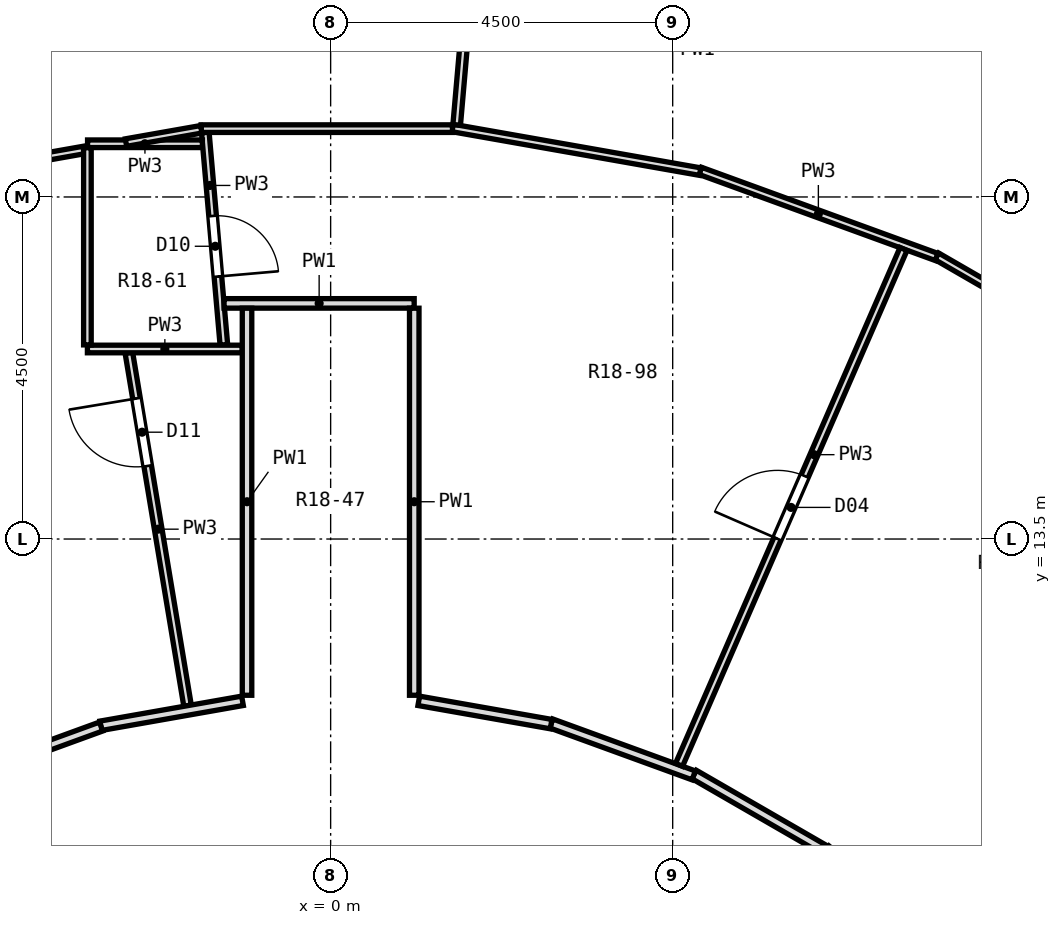
"""IFC4 building model, lengths in metres.
Left out: names, types, materials, properties, quantities, classifications, styles, units other than length and angle.
Written with IfcOpenShell. Run it as: python <this file> out.ifc"""

import sys

from ifc_helpers import new_model, si_unit, direction, frame, frame_2d, origin, place, context, subcontext, project, spatial, rectangle, extrude, element, fill, save


model = new_model("IFC4")
c1 = context("Model", 3, precision=1e-05, world=origin(), true_north=direction((0.0, 1.0)))
c2 = subcontext(c1, "Body", "Model", "MODEL_VIEW")
j1 = project(units=[si_unit("LENGTHUNIT", "METRE"), si_unit("PLANEANGLEUNIT", "RADIAN")], contexts=[c1])
p1 = place(None, origin())
s1 = spatial("IfcSite", under=j1, at=p1, CompositionType="ELEMENT")
p2 = place(p1, origin())
s2 = spatial("IfcBuilding", under=s1, at=p2, CompositionType="ELEMENT")
p3 = place(p2, frame((0.0, 0.0, 101.8)))
s3 = spatial("IfcBuildingStorey", under=s2, at=p3, CompositionType="ELEMENT", Elevation=101.8)
p4 = place(p3, frame((-1.649, 18.849, 0.0), z_axis=(0.0, 0.0, 1.0), x_axis=(0.087061215869, -0.996202963603, 0.0)))
e1 = element("IfcWall", 1, at=p4, inside=s3, PredefinedType="PARTITIONING", context=c2, shape_type="SweptSolid", body=[
    extrude(rectangle(XDim=2.807, YDim=0.1, at=frame_2d((1.404, 0.0))), origin(), (0.0, 0.0, 1.0), 2.8),
])
p5 = place(p4, frame((1.103, 0.0, 0.0)))
e2 = element("IfcOpeningElement", 2, at=p5, cuts=e1, PredefinedType="OPENING", context=c2, shape_type="SweptSolid", body=[
    extrude(rectangle(XDim=0.8, YDim=2.1, at=frame_2d((0.4, 1.05))), frame((0.0, 0.062, 0.0), z_axis=(0.0, -1.0, 0.0), x_axis=(1.0, 0.0, 0.0)), (0.0, 0.0, 1.0), 0.124),
])
p6 = place(p3, frame((-2.655, 15.951, 0.0), z_axis=(0.0, 0.0, 1.0), x_axis=(0.164012054584, -0.986458334625, 0.0)))
e3 = element("IfcWall", 3, at=p6, inside=s3, PredefinedType="PARTITIONING", context=c2, shape_type="SweptSolid", body=[
    extrude(rectangle(XDim=4.707, YDim=0.1, at=frame_2d((2.354, 0.0))), origin(), (0.0, 0.0, 1.0), 2.8),
])
p7 = place(p6, frame((0.61, 0.0, 0.0)))
e4 = element("IfcOpeningElement", 4, at=p7, cuts=e3, PredefinedType="OPENING", context=c2, shape_type="SweptSolid", body=[
    extrude(rectangle(XDim=0.9, YDim=2.1, at=frame_2d((0.45, 1.05))), frame((0.0, 0.062, 0.0), z_axis=(0.0, -1.0, 0.0), x_axis=(1.0, 0.0, 0.0)), (0.0, 0.0, 1.0), 0.124),
])
p8 = place(p3, frame((4.781, 10.403, 0.0), z_axis=(0.0, 0.0, 1.0), x_axis=(0.866173368732, -0.499743629573, 0.0)))
e5 = element("IfcWall", 5, at=p8, inside=s3, PredefinedType="PARTITIONING", context=c2, shape_type="SweptSolid", body=[
    extrude(rectangle(XDim=1.996, YDim=0.125, at=frame_2d((0.998, 0.0))), origin(), (0.0, 0.0, 1.0), 2.8),
])
p9 = place(p3, frame((7.974, 17.219, 0.0), z_axis=(0.0, 0.0, 1.0), x_axis=(0.865857256379, -0.500291126821, 0.0)))
e6 = element("IfcWall", 6, at=p9, inside=s3, PredefinedType="PARTITIONING", context=c2, shape_type="SweptSolid", body=[
    extrude(rectangle(XDim=3.307, YDim=0.1, at=frame_2d((1.654, 0.0))), origin(), (0.0, 0.0, 1.0), 2.8),
])
p10 = place(p3, frame((7.172, 20.695, 0.0), z_axis=(0.0, 0.0, 1.0), x_axis=(0.939171474452, -0.343448601069, 0.0)))
e7 = element("IfcWall", 7, at=p10, inside=s3, PredefinedType="PARTITIONING", context=c2, shape_type="SweptSolid", body=[
    extrude(rectangle(XDim=2.252, YDim=0.1, at=frame_2d((1.126, 0.0))), origin(), (0.0, 0.0, 1.0), 2.8),
])
p11 = place(p3, frame((2.902, 11.073, 0.0), z_axis=(0.0, 0.0, 1.0), x_axis=(0.939557391744, -0.342391453777, 0.0)))
e8 = element("IfcWall", 8, at=p11, inside=s3, PredefinedType="PARTITIONING", context=c2, shape_type="SweptSolid", body=[
    extrude(rectangle(XDim=1.995, YDim=0.125, at=frame_2d((0.998, 0.0))), origin(), (0.0, 0.0, 1.0), 2.8),
])
p12 = place(p3, frame((4.863, 18.344, 0.0), z_axis=(0.0, 0.0, 1.0), x_axis=(0.939551875713, -0.342406589955, 0.0)))
e9 = element("IfcWall", 9, at=p12, inside=s3, PredefinedType="PARTITIONING", context=c2, shape_type="SweptSolid", body=[
    extrude(rectangle(XDim=3.308, YDim=0.1, at=frame_2d((1.654, 0.0))), origin(), (0.0, 0.0, 1.0), 2.8),
])
p13 = place(p3, frame((1.16, 11.371, 0.0), z_axis=(0.0, 0.0, 1.0), x_axis=(0.984859944288, -0.173351925678, 0.0)))
e10 = element("IfcWall", 10, at=p13, inside=s3, PredefinedType="PARTITIONING", context=c2, shape_type="SweptSolid", body=[
    extrude(rectangle(XDim=1.768, YDim=0.125, at=frame_2d((0.884, 0.0))), origin(), (0.0, 0.0, 1.0), 2.8),
])
p14 = place(p3, frame((1.603, 18.908, 0.0), z_axis=(0.0, 0.0, 1.0), x_axis=(0.984831814927, -0.173511660439, 0.0)))
e11 = element("IfcWall", 11, at=p14, inside=s3, PredefinedType="PARTITIONING", context=c2, shape_type="SweptSolid", body=[
    extrude(rectangle(XDim=3.308, YDim=0.1, at=frame_2d((1.654, 0.0))), origin(), (0.0, 0.0, 1.0), 2.8),
])
p15 = place(p3, frame((-3.2, 16.0, 0.0), z_axis=(0.0, 0.0, 1.0), x_axis=(1.0, 0.0, 0.0)))
e12 = element("IfcWall", 12, at=p15, inside=s3, PredefinedType="PARTITIONING", context=c2, shape_type="SweptSolid", body=[
    extrude(rectangle(XDim=2.037, YDim=0.1, at=frame_2d((1.019, 0.0))), origin(), (0.0, 0.0, 1.0), 2.8),
])
p16 = place(p3, frame((-1.402, 16.6, 0.0), z_axis=(0.0, 0.0, 1.0), x_axis=(1.0, 0.0, 0.0)))
e13 = element("IfcWall", 13, at=p16, inside=s3, PredefinedType="PARTITIONING", context=c2, shape_type="SweptSolid", body=[
    extrude(rectangle(XDim=2.501, YDim=0.125, at=frame_2d((1.251, 0.0))), origin(), (0.0, 0.0, 1.0), 2.8),
])
p17 = place(p3, frame((-3.198, 18.7, 0.0), z_axis=(0.0, 0.0, 1.0), x_axis=(1.0, 0.0, 0.0)))
e14 = element("IfcWall", 14, at=p17, inside=s3, PredefinedType="PARTITIONING", context=c2, shape_type="SweptSolid", body=[
    extrude(rectangle(XDim=1.511, YDim=0.1, at=frame_2d((0.755, 0.0))), origin(), (0.0, 0.0, 1.0), 2.8),
])
p18 = place(p3, frame((-1.704, 18.899, 0.0), z_axis=(0.0, 0.0, 1.0), x_axis=(1.0, 0.0, 0.0)))
e15 = element("IfcWall", 15, at=p18, inside=s3, PredefinedType="PARTITIONING", context=c2, shape_type="SweptSolid", body=[
    extrude(rectangle(XDim=3.307, YDim=0.1, at=frame_2d((1.653, 0.0))), origin(), (0.0, 0.0, 1.0), 2.8),
])
p19 = place(p3, frame((-3.024, 11.043, 0.0), z_axis=(0.0, 0.0, 1.0), x_axis=(0.984843218933, 0.173446920187, 0.0)))
e16 = element("IfcWall", 16, at=p19, inside=s3, PredefinedType="PARTITIONING", context=c2, shape_type="SweptSolid", body=[
    extrude(rectangle(XDim=1.893, YDim=0.125, at=frame_2d((0.947, 0.0))), origin(), (0.0, 0.0, 1.0), 2.8),
])
p20 = place(p3, frame((-4.96, 18.315, 0.0), z_axis=(0.0, 0.0, 1.0), x_axis=(0.984767989426, 0.173873537385, 0.0)))
e17 = element("IfcWall", 17, at=p20, inside=s3, PredefinedType="PARTITIONING", context=c2, shape_type="SweptSolid", body=[
    extrude(rectangle(XDim=1.737, YDim=0.1, at=frame_2d((0.868, 0.0))), origin(), (0.0, 0.0, 1.0), 2.8),
])
p21 = place(p3, frame((-2.692, 18.716, 0.0), z_axis=(0.0, 0.0, 1.0), x_axis=(0.984773780307, 0.173840736366, 0.0)))
e18 = element("IfcWall", 18, at=p21, inside=s3, PredefinedType="PARTITIONING", context=c2, shape_type="SweptSolid", body=[
    extrude(rectangle(XDim=1.006, YDim=0.1, at=frame_2d((0.503, 0.0))), origin(), (0.0, 0.0, 1.0), 2.8),
])
p22 = place(p3, frame((-4.896, 10.349, 0.0), z_axis=(0.0, 0.0, 1.0), x_axis=(0.939546719529, 0.342420738016, 0.0)))
e19 = element("IfcWall", 19, at=p22, inside=s3, PredefinedType="PARTITIONING", context=c2, shape_type="SweptSolid", body=[
    extrude(rectangle(XDim=1.996, YDim=0.125, at=frame_2d((0.998, 0.0))), origin(), (0.0, 0.0, 1.0), 2.8),
])
p23 = place(p3, frame((8.136, 8.136, 0.0), z_axis=(0.0, 0.0, 1.0), x_axis=(0.707106781187, 0.707106781187, 0.0)))
e20 = element("IfcWall", 20, at=p23, inside=s3, PredefinedType="PARTITIONING", context=c2, shape_type="SweptSolid", body=[
    extrude(rectangle(XDim=7.415, YDim=0.125, at=frame_2d((3.708, 0.0))), origin(), (0.0, 0.0, 1.0), 2.8),
])
p24 = place(p3, frame((4.584, 10.529, 0.0), z_axis=(0.0, 0.0, 1.0), x_axis=(0.39900110087, 0.916950446592, 0.0)))
e21 = element("IfcWall", 21, at=p24, inside=s3, PredefinedType="PARTITIONING", context=c2, shape_type="SweptSolid", body=[
    extrude(rectangle(XDim=7.401, YDim=0.1, at=frame_2d((3.701, 0.0))), origin(), (0.0, 0.0, 1.0), 2.8),
])
p25 = place(p24, frame((3.243, 0.0, 0.0)))
e22 = element("IfcOpeningElement", 22, at=p25, cuts=e21, PredefinedType="OPENING", context=c2, shape_type="SweptSolid", body=[
    extrude(rectangle(XDim=0.9, YDim=2.1, at=frame_2d((0.45, 1.05))), frame((0.0, 0.062, 0.0), z_axis=(0.0, -1.0, 0.0), x_axis=(1.0, 0.0, 0.0)), (0.0, 0.0, 1.0), 0.124),
])
p26 = place(p3, frame((1.658, 18.949, 0.0), z_axis=(0.0, 0.0, 1.0), x_axis=(0.087052988713, 0.996203682565, 0.0)))
e23 = element("IfcWall", 23, at=p26, inside=s3, PredefinedType="PARTITIONING", context=c2, shape_type="SweptSolid", body=[
    extrude(rectangle(XDim=6.644, YDim=0.1, at=frame_2d((3.322, 0.0))), origin(), (0.0, 0.0, 1.0), 2.8),
])
for number, where, z_axis, x_axis in (
    (24, (1.1, 11.445, 0.0), (0.0, 0.0, 1.0), (0.0, 1.0, 0.0)),
    (25, (-1.1, 11.445, 0.0), (0.0, 0.0, 1.0), (0.0, 1.0, 0.0)),
):
    element("IfcWall", number, at=place(p3, frame(where, z_axis=z_axis, x_axis=x_axis)), inside=s3, PredefinedType="PARTITIONING", context=c2, shape_type="SweptSolid", body=[
        extrude(rectangle(XDim=5.092, YDim=0.125, at=frame_2d((2.546, 0.0))), origin(), (0.0, 0.0, 1.0), 2.8),
    ])
p27 = place(p3, frame((-3.2, 16.054, 0.0), z_axis=(0.0, 0.0, 1.0), x_axis=(0.0, 1.0, 0.0)))
e26 = element("IfcWall", 26, at=p27, inside=s3, PredefinedType="PARTITIONING", context=c2, shape_type="SweptSolid", body=[
    extrude(rectangle(XDim=2.594, YDim=0.1, at=frame_2d((1.297, 0.0))), origin(), (0.0, 0.0, 1.0), 2.8),
])
p28 = place(p25, origin())
e27 = element("IfcDoor", 27, at=p28, inside=s3, OperationType="SINGLE_SWING_LEFT", PredefinedType="DOOR", context=c2, shape_type="SweptSolid", body=[
    extrude(rectangle(XDim=0.9, YDim=2.1, at=frame_2d((0.45, 1.05))), frame((0.0, 0.025, 0.0), z_axis=(0.0, -1.0, 0.0), x_axis=(1.0, 0.0, 0.0)), (0.0, 0.0, 1.0), 0.05),
])
fill(e22, e27)
p29 = place(p5, origin())
e28 = element("IfcDoor", 28, at=p29, inside=s3, OperationType="SINGLE_SWING_RIGHT", PredefinedType="DOOR", context=c2, shape_type="SweptSolid", body=[
    extrude(rectangle(XDim=0.8, YDim=2.1, at=frame_2d((0.4, 1.05))), frame((0.0, 0.025, 0.0), z_axis=(0.0, -1.0, 0.0), x_axis=(1.0, 0.0, 0.0)), (0.0, 0.0, 1.0), 0.05),
])
fill(e2, e28)
p30 = place(p7, frame((0.9, 0.0, 0.0), z_axis=(0.0, 0.0, 1.0), x_axis=(-1.0, 0.0, 0.0)))
e29 = element("IfcDoor", 29, at=p30, inside=s3, OperationType="SINGLE_SWING_RIGHT", PredefinedType="DOOR", context=c2, shape_type="SweptSolid", body=[
    extrude(rectangle(XDim=0.9, YDim=2.1, at=frame_2d((0.45, 1.05))), frame((0.0, 0.025, 0.0), z_axis=(0.0, -1.0, 0.0), x_axis=(1.0, 0.0, 0.0)), (0.0, 0.0, 1.0), 0.05),
])
fill(e4, e29)
save(model, sys.argv[1])
